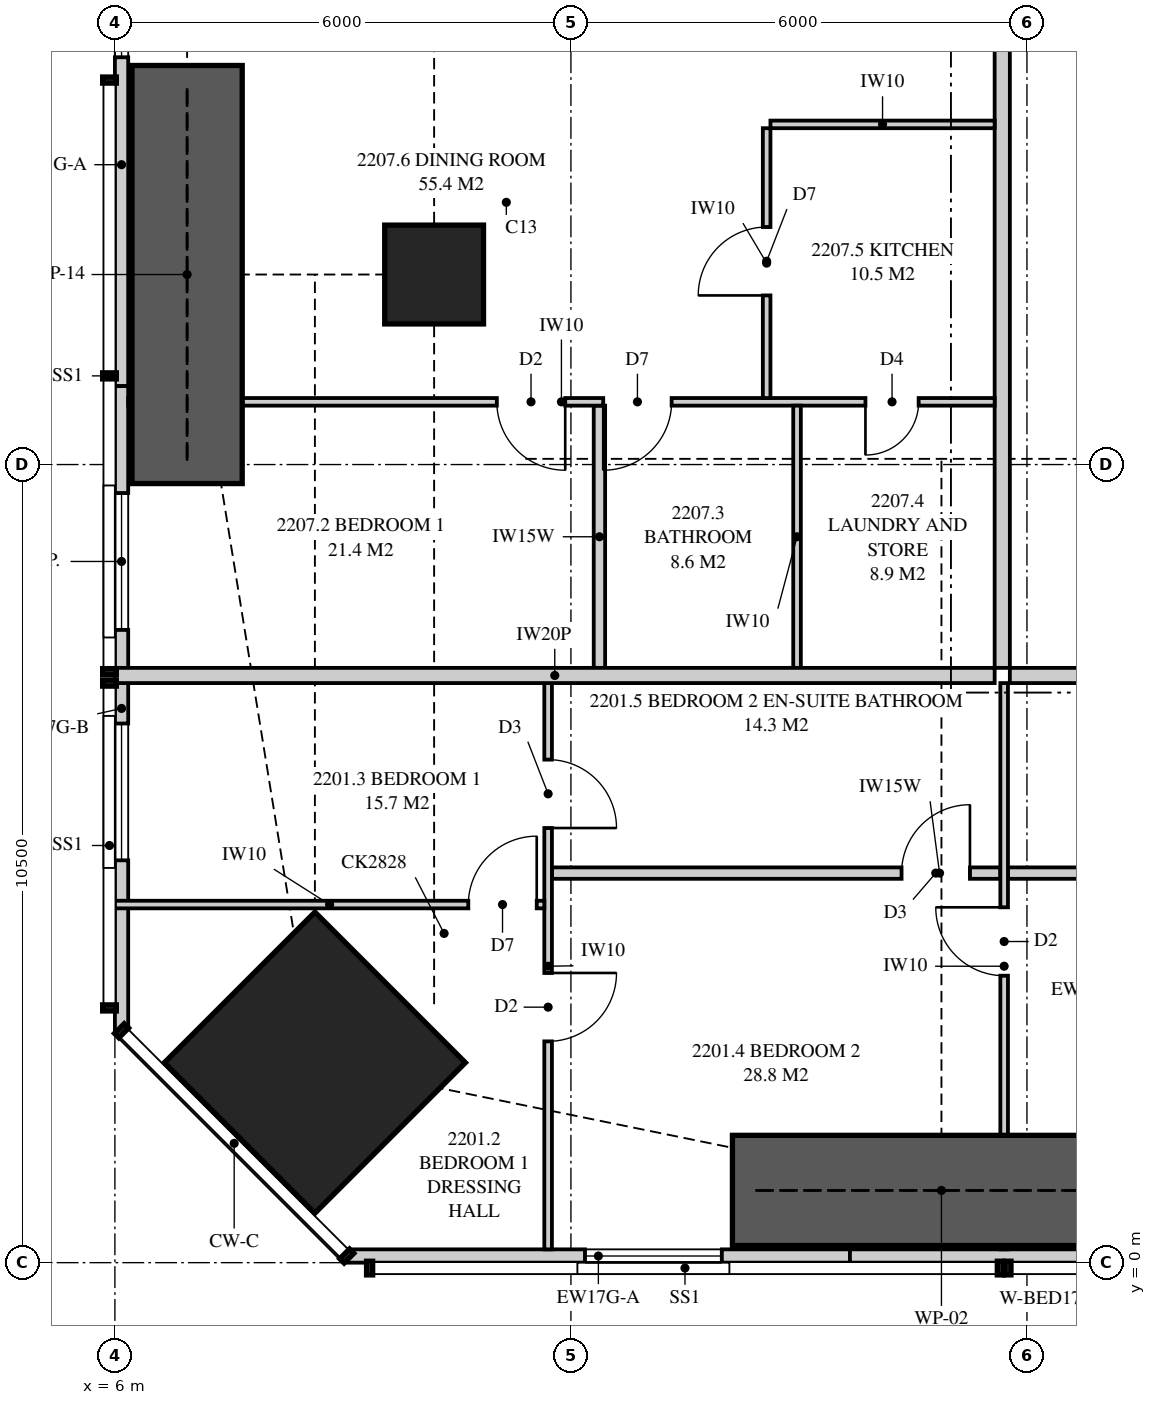
"""IFC4 building model, lengths in metres.
Left out: names, types, materials, properties, quantities, classifications, styles, units other than length and angle.
Written with IfcOpenShell. Run it as: python <this file> out.ifc"""

import sys

from ifc_helpers import new_model, si_unit, direction, frame, frame_2d, origin, origin_2d, place, context, subcontext, project, spatial, polyline, rectangle, hollow_rectangle, outline, extrude, element, fill, save


model = new_model("IFC4")
c1 = context("Model", 3, precision=1e-05, world=origin(), true_north=direction((0.0, 1.0)))
c2 = subcontext(c1, "Body", "Model", "MODEL_VIEW")
j1 = project(units=[si_unit("LENGTHUNIT", "METRE"), si_unit("PLANEANGLEUNIT", "RADIAN")], contexts=[c1])
p1 = place(None, origin())
s1 = spatial("IfcSite", under=j1, at=p1, CompositionType="ELEMENT")
p2 = place(p1, origin())
s2 = spatial("IfcBuilding", under=s1, at=p2, CompositionType="ELEMENT")
p3 = place(p2, frame((0.0, 0.0, 84.75)))
s3 = spatial("IfcBuildingStorey", under=s2, at=p3, CompositionType="ELEMENT", Elevation=84.75)
p4 = place(p3, frame((8.631, 2.631, 0.0), z_axis=(0.0, 0.0, 1.0), x_axis=(0.707106781187, 0.707106781187, 0.0)))
e1 = element("IfcColumn", 1, at=p4, inside=s3, PredefinedType="COLUMN", context=c2, shape_type="SweptSolid", body=[
    extrude(hollow_rectangle(XDim=2.8, YDim=2.8, WallThickness=0.175, at=origin_2d()), origin(), (0.0, 0.0, 1.0), 3.35),
])
p5 = place(p3, frame((10.2, 13.0, 0.0), z_axis=(0.0, 0.0, 1.0), x_axis=(1.0, 0.0, 0.0)))
e2 = element("IfcColumn", 2, at=p5, inside=s3, PredefinedType="COLUMN", context=c2, shape_type="SweptSolid", body=[
    extrude(rectangle(XDim=1.3, YDim=1.3, at=origin_2d()), origin(), (0.0, 0.0, 1.0), 3.35),
])
p6 = place(p3, frame((9.051, 0.087, 0.0), z_axis=(0.0, 0.0, 1.0), x_axis=(1.0, 0.0, 0.0)))
e3 = element("IfcWall", 3, at=p6, inside=s3, PredefinedType="SOLIDWALL", context=c2, shape_type="SweptSolid", body=[
    extrude(rectangle(XDim=6.62, YDim=0.175, at=frame_2d((3.31, 0.0))), origin(), (0.0, 0.0, 1.0), 3.11),
])
p7 = place(p6, frame((3.134, 0.0, 0.4)))
e4 = element("IfcOpeningElement", 4, at=p7, cuts=e3, PredefinedType="OPENING", context=c2, shape_type="SweptSolid", body=[
    extrude(rectangle(XDim=1.8, YDim=1.7, at=frame_2d((0.9, 0.85))), frame((0.0, 0.097, 0.0), z_axis=(0.0, -1.0, 0.0), x_axis=(1.0, 0.0, 0.0)), (0.0, 0.0, 1.0), 0.195),
])
p8 = place(p3, frame((15.671, 0.087, 0.0), z_axis=(0.0, 0.0, 1.0), x_axis=(1.0, 0.0, 0.0)))
e5 = element("IfcWall", 5, at=p8, inside=s3, PredefinedType="SOLIDWALL", context=c2, shape_type="SweptSolid", body=[
    extrude(rectangle(XDim=6.379, YDim=0.175, at=frame_2d((3.189, 0.0))), origin(), (0.0, 0.0, 1.0), 2.15),
])
p9 = place(p8, frame((4.087, 0.0, 0.4)))
e6 = element("IfcOpeningElement", 6, at=p9, cuts=e5, PredefinedType="OPENING", context=c2, shape_type="SweptSolid", body=[
    extrude(rectangle(XDim=1.8, YDim=1.7, at=frame_2d((0.9, 0.85))), frame((0.0, 0.097, 0.0), z_axis=(0.0, -1.0, 0.0), x_axis=(1.0, 0.0, 0.0)), (0.0, 0.0, 1.0), 0.195),
])
p10 = place(p3, frame((6.087, 17.358, 0.0), z_axis=(0.0, 0.0, 1.0), x_axis=(0.0, -1.0, 0.0)))
e7 = element("IfcWall", 7, at=p10, inside=s3, PredefinedType="SOLIDWALL", context=c2, shape_type="SweptSolid", body=[
    extrude(outline(polyline([(5.118, 0.092), (5.118, 0.0), (5.826, 0.0), (5.826, 2.15), (0.0, 2.15), (0.0, 0.0), (3.598, 0.0), (3.598, 0.092), (5.118, 0.092)])), frame((0.0, 0.087, 0.0), z_axis=(0.0, -1.0, 0.0), x_axis=(1.0, 0.0, 0.0)), (0.0, 0.0, 1.0), 0.175),
])
p11 = place(p10, frame((0.3, 0.0, 0.4)))
e8 = element("IfcOpeningElement", 8, at=p11, cuts=e7, PredefinedType="OPENING", context=c2, shape_type="SweptSolid", body=[
    extrude(rectangle(XDim=1.2, YDim=1.7, at=frame_2d((0.6, 0.85))), frame((0.0, 0.097, 0.0), z_axis=(0.0, -1.0, 0.0), x_axis=(1.0, 0.0, 0.0)), (0.0, 0.0, 1.0), 0.195),
])
p12 = place(p3, frame((6.087, 11.532, 0.0), z_axis=(0.0, 0.0, 1.0), x_axis=(0.0, -1.0, 0.0)))
e9 = element("IfcWall", 9, at=p12, inside=s3, PredefinedType="SOLIDWALL", context=c2, shape_type="SweptSolid", body=[
    extrude(rectangle(XDim=8.481, YDim=0.175, at=frame_2d((4.24, 0.0))), origin(), (0.0, 0.0, 1.0), 3.11),
])
p13 = place(p12, frame((1.407, 0.0, 0.4)))
e10 = element("IfcOpeningElement", 10, at=p13, cuts=e9, PredefinedType="OPENING", context=c2, shape_type="SweptSolid", body=[
    extrude(rectangle(XDim=1.8, YDim=1.7, at=frame_2d((0.9, 0.85))), frame((0.0, 0.097, 0.0), z_axis=(0.0, -1.0, 0.0), x_axis=(1.0, 0.0, 0.0)), (0.0, 0.0, 1.0), 0.195),
])
p14 = place(p12, frame((4.439, 0.0, 0.4)))
e11 = element("IfcOpeningElement", 11, at=p14, cuts=e9, PredefinedType="OPENING", context=c2, shape_type="SweptSolid", body=[
    extrude(rectangle(XDim=1.8, YDim=1.7, at=frame_2d((0.9, 0.85))), frame((0.0, 0.097, 0.0), z_axis=(0.0, -1.0, 0.0), x_axis=(1.0, 0.0, 0.0)), (0.0, 0.0, 1.0), 0.195),
])
p15 = place(p3, frame((17.775, 7.725, 0.0), z_axis=(0.0, 0.0, 1.0), x_axis=(1.0, 0.0, 0.0)))
e12 = element("IfcWall", 12, at=p15, inside=s3, PredefinedType="PARTITIONING", context=c2, shape_type="SweptSolid", body=[
    extrude(rectangle(XDim=4.325, YDim=0.2, at=frame_2d((2.163, 0.0))), origin(), (0.0, 0.0, 1.0), 3.11),
])
p16 = place(p3, frame((11.7, 0.175, 0.0), z_axis=(0.0, 0.0, 1.0), x_axis=(0.0, 1.0, 0.0)))
e13 = element("IfcWall", 13, at=p16, inside=s3, PredefinedType="PARTITIONING", context=c2, shape_type="SweptSolid", body=[
    extrude(outline(polyline([(0.0, 0.0), (7.45, 0.0), (7.45, 3.11), (2.912, 3.11), (2.912, 2.15), (0.749, 2.15), (0.749, 3.11), (0.0, 3.11), (0.0, 0.0)])), frame((0.0, 0.05, 0.0), z_axis=(0.0, -1.0, 0.0), x_axis=(1.0, 0.0, 0.0)), (0.0, 0.0, 1.0), 0.1),
])
p17 = place(p16, frame((2.736, 0.0, 0.0)))
e14 = element("IfcOpeningElement", 14, at=p17, cuts=e13, PredefinedType="OPENING", context=c2, shape_type="SweptSolid", body=[
    extrude(rectangle(XDim=0.9, YDim=2.1, at=frame_2d((0.45, 1.05))), frame((0.0, 0.06, 0.0), z_axis=(0.0, -1.0, 0.0), x_axis=(1.0, 0.0, 0.0)), (0.0, 0.0, 1.0), 0.12),
])
p18 = place(p16, frame((5.543, 0.0, 0.0)))
e15 = element("IfcOpeningElement", 15, at=p18, cuts=e13, PredefinedType="OPENING", context=c2, shape_type="SweptSolid", body=[
    extrude(rectangle(XDim=0.9, YDim=2.1, at=frame_2d((0.45, 1.05))), frame((0.0, 0.06, 0.0), z_axis=(0.0, -1.0, 0.0), x_axis=(1.0, 0.0, 0.0)), (0.0, 0.0, 1.0), 0.12),
])
p19 = place(p3, frame((17.7, 0.175, 0.0), z_axis=(0.0, 0.0, 1.0), x_axis=(0.0, 1.0, 0.0)))
e16 = element("IfcWall", 16, at=p19, inside=s3, PredefinedType="PARTITIONING", context=c2, shape_type="SweptSolid", body=[
    extrude(outline(polyline([(1.835, 2.15), (0.0, 2.15), (0.0, 0.0), (0.529, 0.0), (0.529, 0.625), (1.021, 0.625), (1.021, 0.0), (7.45, 0.0), (7.45, 3.11), (1.835, 3.11), (1.835, 2.15)]), holes=[polyline([(1.021, 1.075), (0.529, 1.075), (0.529, 1.905), (1.021, 1.905), (1.021, 1.075)])]), frame((0.0, 0.05, 0.0), z_axis=(0.0, -1.0, 0.0), x_axis=(1.0, 0.0, 0.0)), (0.0, 0.0, 1.0), 0.1),
])
p20 = place(p19, frame((3.6, 0.0, 0.0)))
e17 = element("IfcOpeningElement", 17, at=p20, cuts=e16, PredefinedType="OPENING", context=c2, shape_type="SweptSolid", body=[
    extrude(rectangle(XDim=0.9, YDim=2.1, at=frame_2d((0.45, 1.05))), frame((0.0, 0.06, 0.0), z_axis=(0.0, -1.0, 0.0), x_axis=(1.0, 0.0, 0.0)), (0.0, 0.0, 1.0), 0.12),
])
p21 = place(p3, frame((6.0, 4.711, 0.0), z_axis=(0.0, 0.0, 1.0), x_axis=(1.0, 0.0, 0.0)))
e18 = element("IfcWall", 18, at=p21, inside=s3, PredefinedType="PARTITIONING", context=c2, shape_type="SweptSolid", body=[
    extrude(outline(polyline([(0.0, 0.0), (5.65, 0.0), (5.65, 3.11), (5.46, 3.11), (5.46, 2.51), (3.368, 2.51), (3.368, 2.15), (1.22, 2.15), (1.22, 3.11), (0.0, 3.11), (0.0, 0.0)])), frame((0.0, 0.05, 0.0), z_axis=(0.0, -1.0, 0.0), x_axis=(1.0, 0.0, 0.0)), (0.0, 0.0, 1.0), 0.1),
])
p22 = place(p21, frame((4.65, 0.0, 0.0)))
e19 = element("IfcOpeningElement", 19, at=p22, cuts=e18, PredefinedType="OPENING", context=c2, shape_type="SweptSolid", body=[
    extrude(rectangle(XDim=0.9, YDim=2.1, at=frame_2d((0.45, 1.05))), frame((0.0, 0.06, 0.0), z_axis=(0.0, -1.0, 0.0), x_axis=(1.0, 0.0, 0.0)), (0.0, 0.0, 1.0), 0.12),
])
p23 = place(p3, frame((11.75, 5.125, 0.0), z_axis=(0.0, 0.0, 1.0), x_axis=(1.0, 0.0, 0.0)))
e20 = element("IfcWall", 20, at=p23, inside=s3, PredefinedType="PLUMBINGWALL", context=c2, shape_type="SweptSolid", body=[
    extrude(outline(polyline([(0.0, 0.0), (5.9, 0.0), (5.9, 3.11), (5.446, 3.11), (5.446, 2.531), (4.804, 2.531), (4.804, 3.11), (0.0, 3.11), (0.0, 0.0)])), frame((0.0, 0.075, 0.0), z_axis=(0.0, -1.0, 0.0), x_axis=(1.0, 0.0, 0.0)), (0.0, 0.0, 1.0), 0.15),
])
p24 = place(p23, frame((4.6, 0.0, 0.0)))
e21 = element("IfcOpeningElement", 21, at=p24, cuts=e20, PredefinedType="OPENING", context=c2, shape_type="SweptSolid", body=[
    extrude(rectangle(XDim=0.9, YDim=2.1, at=frame_2d((0.45, 1.05))), frame((0.0, 0.085, 0.0), z_axis=(0.0, -1.0, 0.0), x_axis=(1.0, 0.0, 0.0)), (0.0, 0.0, 1.0), 0.17),
])
p25 = place(p3, frame((17.75, 5.125, 0.0), z_axis=(0.0, 0.0, 1.0), x_axis=(1.0, 0.0, 0.0)))
e22 = element("IfcWall", 22, at=p25, inside=s3, PredefinedType="PLUMBINGWALL", context=c2, shape_type="SweptSolid", body=[
    extrude(rectangle(XDim=4.2, YDim=0.15, at=frame_2d((2.1, 0.0))), origin(), (0.0, 0.0, 1.0), 3.11),
])
p26 = place(p3, frame((6.0, 7.725, 0.0), z_axis=(0.0, 0.0, 1.0), x_axis=(1.0, 0.0, 0.0)))
e23 = element("IfcWall", 23, at=p26, inside=s3, PredefinedType="PARTITIONING", context=c2, shape_type="SweptSolid", body=[
    extrude(outline(polyline([(0.0, 0.0), (11.575, 0.0), (11.575, 3.11), (11.221, 3.11), (11.221, 2.531), (10.529, 2.531), (10.529, 3.11), (5.51, 3.11), (5.51, 2.51), (2.978, 2.51), (2.978, 2.531), (2.93, 2.531), (2.93, 2.15), (0.681, 2.15), (0.681, 3.11), (0.0, 3.11), (0.0, 0.0)])), frame((0.0, 0.1, 0.0), z_axis=(0.0, -1.0, 0.0), x_axis=(1.0, 0.0, 0.0)), (0.0, 0.0, 1.0), 0.2),
])
p27 = place(p3, frame((17.675, 7.825, 0.0), z_axis=(0.0, 0.0, 1.0), x_axis=(0.0, 1.0, 0.0)))
e24 = element("IfcWall", 24, at=p27, inside=s3, PredefinedType="PARTITIONING", context=c2, shape_type="SweptSolid", body=[
    extrude(outline(polyline([(0.0, 0.0), (9.075, 0.0), (9.075, 3.11), (3.096, 3.11), (3.096, 2.531), (2.404, 2.531), (2.404, 3.11), (0.0, 3.11), (0.0, 0.0)])), frame((0.0, 0.1, 0.0), z_axis=(0.0, -1.0, 0.0), x_axis=(1.0, 0.0, 0.0)), (0.0, 0.0, 1.0), 0.2),
])
p28 = place(p3, frame((6.175, 11.325, 0.0), z_axis=(0.0, 0.0, 1.0), x_axis=(1.0, 0.0, 0.0)))
e25 = element("IfcWall", 25, at=p28, inside=s3, PredefinedType="PARTITIONING", context=c2, shape_type="SweptSolid", body=[
    extrude(outline(polyline([(0.0, 0.0), (11.4, 0.0), (11.4, 3.11), (5.285, 3.11), (5.285, 2.51), (2.765, 2.51), (2.765, 3.11), (2.753, 3.11), (2.753, 2.531), (2.16, 2.531), (2.16, 3.11), (2.121, 3.11), (2.121, 2.15), (1.021, 2.15), (1.021, 1.734), (0.529, 1.734), (0.529, 2.15), (0.0, 2.15), (0.0, 0.0)])), frame((0.0, 0.05, 0.0), z_axis=(0.0, -1.0, 0.0), x_axis=(1.0, 0.0, 0.0)), (0.0, 0.0, 1.0), 0.1),
])
p29 = place(p28, frame((4.85, 0.0, 0.0)))
e26 = element("IfcOpeningElement", 26, at=p29, cuts=e25, PredefinedType="OPENING", context=c2, shape_type="SweptSolid", body=[
    extrude(rectangle(XDim=0.9, YDim=2.1, at=frame_2d((0.45, 1.05))), frame((0.0, 0.06, 0.0), z_axis=(0.0, -1.0, 0.0), x_axis=(1.0, 0.0, 0.0)), (0.0, 0.0, 1.0), 0.12),
])
p30 = place(p28, frame((6.25, 0.0, 0.0)))
e27 = element("IfcOpeningElement", 27, at=p30, cuts=e25, PredefinedType="OPENING", context=c2, shape_type="SweptSolid", body=[
    extrude(rectangle(XDim=0.9, YDim=2.1, at=frame_2d((0.45, 1.05))), frame((0.0, 0.06, 0.0), z_axis=(0.0, -1.0, 0.0), x_axis=(1.0, 0.0, 0.0)), (0.0, 0.0, 1.0), 0.12),
])
p31 = place(p28, frame((9.7, 0.0, 0.0)))
e28 = element("IfcOpeningElement", 28, at=p31, cuts=e25, PredefinedType="OPENING", context=c2, shape_type="SweptSolid", body=[
    extrude(rectangle(XDim=0.7, YDim=2.1, at=frame_2d((0.35, 1.05))), frame((0.0, 0.06, 0.0), z_axis=(0.0, -1.0, 0.0), x_axis=(1.0, 0.0, 0.0)), (0.0, 0.0, 1.0), 0.12),
])
p32 = place(p3, frame((12.375, 7.825, 0.0), z_axis=(0.0, 0.0, 1.0), x_axis=(0.0, 1.0, 0.0)))
e29 = element("IfcWall", 29, at=p32, inside=s3, PredefinedType="PLUMBINGWALL", context=c2, shape_type="SweptSolid", body=[
    extrude(outline(polyline([(0.0, 0.0), (3.45, 0.0), (3.45, 3.11), (3.071, 3.11), (3.071, 2.531), (2.429, 2.531), (2.429, 3.11), (0.0, 3.11), (0.0, 0.0)])), frame((0.0, 0.075, 0.0), z_axis=(0.0, -1.0, 0.0), x_axis=(1.0, 0.0, 0.0)), (0.0, 0.0, 1.0), 0.15),
])
p33 = place(p3, frame((14.975, 7.825, 0.0), z_axis=(0.0, 0.0, 1.0), x_axis=(0.0, 1.0, 0.0)))
e30 = element("IfcWall", 30, at=p33, inside=s3, PredefinedType="PARTITIONING", context=c2, shape_type="SweptSolid", body=[
    extrude(outline(polyline([(0.0, 0.0), (3.45, 0.0), (3.45, 3.11), (3.046, 3.11), (3.046, 2.531), (2.454, 2.531), (2.454, 3.11), (0.0, 3.11), (0.0, 0.0)])), frame((0.0, 0.05, 0.0), z_axis=(0.0, -1.0, 0.0), x_axis=(1.0, 0.0, 0.0)), (0.0, 0.0, 1.0), 0.1),
])
p34 = place(p3, frame((14.575, 11.375, 0.0), z_axis=(0.0, 0.0, 1.0), x_axis=(0.0, 1.0, 0.0)))
e31 = element("IfcWall", 31, at=p34, inside=s3, PredefinedType="PARTITIONING", context=c2, shape_type="SweptSolid", body=[
    extrude(rectangle(XDim=3.55, YDim=0.1, at=frame_2d((1.775, 0.0))), origin(), (0.0, 0.0, 1.0), 3.11),
])
p35 = place(p34, frame((1.35, 0.0, 0.0)))
e32 = element("IfcOpeningElement", 32, at=p35, cuts=e31, PredefinedType="OPENING", context=c2, shape_type="SweptSolid", body=[
    extrude(rectangle(XDim=0.9, YDim=2.1, at=frame_2d((0.45, 1.05))), frame((0.0, 0.06, 0.0), z_axis=(0.0, -1.0, 0.0), x_axis=(1.0, 0.0, 0.0)), (0.0, 0.0, 1.0), 0.12),
])
p36 = place(p3, frame((14.625, 14.975, 0.0), z_axis=(0.0, 0.0, 1.0), x_axis=(1.0, 0.0, 0.0)))
e33 = element("IfcWall", 33, at=p36, inside=s3, PredefinedType="PARTITIONING", context=c2, shape_type="SweptSolid", body=[
    extrude(rectangle(XDim=2.95, YDim=0.1, at=frame_2d((1.475, 0.0))), origin(), (0.0, 0.0, 1.0), 3.11),
])
for number, where, z_axis, x_axis in (
    (34, (14.125, 0.95, 0.0), (0.0, 0.0, 1.0), (1.0, 0.0, 0.0)),
    (35, (6.95, 10.25, 0.0), (0.0, 0.0, 1.0), (0.0, 1.0, 0.0)),
):
    element("IfcWall", number, at=place(p3, frame(where, z_axis=z_axis, x_axis=x_axis)), inside=s3, PredefinedType="SHEAR", context=c2, shape_type="SweptSolid", body=[
        extrude(rectangle(XDim=5.5, YDim=1.45, at=frame_2d((2.75, 0.0))), origin(), (0.0, 0.0, 1.0), 3.35),
    ])
p37 = place(p7, origin())
e36 = element("IfcWindow", 36, at=p37, inside=s3, PartitioningType="SINGLE_PANEL", PredefinedType="WINDOW", context=c2, shape_type="SweptSolid", body=[
    extrude(rectangle(XDim=1.8, YDim=1.7, at=frame_2d((0.9, 0.85))), frame((0.0, 0.03, 0.0), z_axis=(0.0, -1.0, 0.0), x_axis=(1.0, 0.0, 0.0)), (0.0, 0.0, 1.0), 0.06),
])
fill(e4, e36)
p38 = place(p11, origin())
e37 = element("IfcWindow", 37, at=p38, inside=s3, PartitioningType="SINGLE_PANEL", PredefinedType="WINDOW", context=c2, shape_type="SweptSolid", body=[
    extrude(rectangle(XDim=1.2, YDim=1.7, at=frame_2d((0.6, 0.85))), frame((0.0, 0.03, 0.0), z_axis=(0.0, -1.0, 0.0), x_axis=(1.0, 0.0, 0.0)), (0.0, 0.0, 1.0), 0.06),
])
fill(e8, e37)
p39 = place(p13, origin())
e38 = element("IfcWindow", 38, at=p39, inside=s3, PartitioningType="SINGLE_PANEL", PredefinedType="WINDOW", context=c2, shape_type="SweptSolid", body=[
    extrude(rectangle(XDim=1.8, YDim=1.7, at=frame_2d((0.9, 0.85))), frame((0.0, 0.03, 0.0), z_axis=(0.0, -1.0, 0.0), x_axis=(1.0, 0.0, 0.0)), (0.0, 0.0, 1.0), 0.06),
])
fill(e10, e38)
p40 = place(p14, origin())
e39 = element("IfcWindow", 39, at=p40, inside=s3, PartitioningType="SINGLE_PANEL", PredefinedType="WINDOW", context=c2, shape_type="SweptSolid", body=[
    extrude(rectangle(XDim=1.8, YDim=1.7, at=frame_2d((0.9, 0.85))), frame((0.0, 0.03, 0.0), z_axis=(0.0, -1.0, 0.0), x_axis=(1.0, 0.0, 0.0)), (0.0, 0.0, 1.0), 0.06),
])
fill(e11, e39)
p41 = place(p22, origin())
e40 = element("IfcDoor", 40, at=p41, inside=s3, OperationType="SINGLE_SWING_RIGHT", PredefinedType="DOOR", context=c2, shape_type="SweptSolid", body=[
    extrude(rectangle(XDim=0.9, YDim=2.1, at=frame_2d((0.45, 1.05))), frame((0.0, 0.025, 0.0), z_axis=(0.0, -1.0, 0.0), x_axis=(1.0, 0.0, 0.0)), (0.0, 0.0, 1.0), 0.05),
])
fill(e19, e40)
p42 = place(p17, frame((0.9, 0.0, 0.0), z_axis=(0.0, 0.0, 1.0), x_axis=(-1.0, 0.0, 0.0)))
e41 = element("IfcDoor", 41, at=p42, inside=s3, OperationType="SINGLE_SWING_LEFT", PredefinedType="DOOR", context=c2, shape_type="SweptSolid", body=[
    extrude(rectangle(XDim=0.9, YDim=2.1, at=frame_2d((0.45, 1.05))), frame((0.0, 0.025, 0.0), z_axis=(0.0, -1.0, 0.0), x_axis=(1.0, 0.0, 0.0)), (0.0, 0.0, 1.0), 0.05),
])
fill(e14, e41)
p43 = place(p20, origin())
e42 = element("IfcDoor", 42, at=p43, inside=s3, OperationType="SINGLE_SWING_RIGHT", PredefinedType="DOOR", context=c2, shape_type="SweptSolid", body=[
    extrude(rectangle(XDim=0.9, YDim=2.1, at=frame_2d((0.45, 1.05))), frame((0.0, 0.025, 0.0), z_axis=(0.0, -1.0, 0.0), x_axis=(1.0, 0.0, 0.0)), (0.0, 0.0, 1.0), 0.05),
])
fill(e17, e42)
p44 = place(p24, origin())
e43 = element("IfcDoor", 43, at=p44, inside=s3, OperationType="SINGLE_SWING_RIGHT", PredefinedType="DOOR", context=c2, shape_type="SweptSolid", body=[
    extrude(rectangle(XDim=0.9, YDim=2.1, at=frame_2d((0.45, 1.05))), frame((0.0, 0.025, 0.0), z_axis=(0.0, -1.0, 0.0), x_axis=(1.0, 0.0, 0.0)), (0.0, 0.0, 1.0), 0.05),
])
fill(e21, e43)
p45 = place(p18, frame((0.9, 0.0, 0.0), z_axis=(0.0, 0.0, 1.0), x_axis=(-1.0, 0.0, 0.0)))
e44 = element("IfcDoor", 44, at=p45, inside=s3, OperationType="SINGLE_SWING_RIGHT", PredefinedType="DOOR", context=c2, shape_type="SweptSolid", body=[
    extrude(rectangle(XDim=0.9, YDim=2.1, at=frame_2d((0.45, 1.05))), frame((0.0, 0.025, 0.0), z_axis=(0.0, -1.0, 0.0), x_axis=(1.0, 0.0, 0.0)), (0.0, 0.0, 1.0), 0.05),
])
fill(e15, e44)
p46 = place(p29, frame((0.9, 0.0, 0.0), z_axis=(0.0, 0.0, 1.0), x_axis=(-1.0, 0.0, 0.0)))
e45 = element("IfcDoor", 45, at=p46, inside=s3, OperationType="SINGLE_SWING_LEFT", PredefinedType="DOOR", context=c2, shape_type="SweptSolid", body=[
    extrude(rectangle(XDim=0.9, YDim=2.1, at=frame_2d((0.45, 1.05))), frame((0.0, 0.025, 0.0), z_axis=(0.0, -1.0, 0.0), x_axis=(1.0, 0.0, 0.0)), (0.0, 0.0, 1.0), 0.05),
])
fill(e26, e45)
p47 = place(p30, frame((0.9, 0.0, 0.0), z_axis=(0.0, 0.0, 1.0), x_axis=(-1.0, 0.0, 0.0)))
e46 = element("IfcDoor", 46, at=p47, inside=s3, OperationType="SINGLE_SWING_RIGHT", PredefinedType="DOOR", context=c2, shape_type="SweptSolid", body=[
    extrude(rectangle(XDim=0.9, YDim=2.1, at=frame_2d((0.45, 1.05))), frame((0.0, 0.025, 0.0), z_axis=(0.0, -1.0, 0.0), x_axis=(1.0, 0.0, 0.0)), (0.0, 0.0, 1.0), 0.05),
])
fill(e27, e46)
p48 = place(p31, frame((0.7, 0.0, 0.0), z_axis=(0.0, 0.0, 1.0), x_axis=(-1.0, 0.0, 0.0)))
e47 = element("IfcDoor", 47, at=p48, inside=s3, OperationType="SINGLE_SWING_RIGHT", PredefinedType="DOOR", context=c2, shape_type="SweptSolid", body=[
    extrude(rectangle(XDim=0.7, YDim=2.1, at=frame_2d((0.35, 1.05))), frame((0.0, 0.025, 0.0), z_axis=(0.0, -1.0, 0.0), x_axis=(1.0, 0.0, 0.0)), (0.0, 0.0, 1.0), 0.05),
])
fill(e28, e47)
p49 = place(p35, origin())
e48 = element("IfcDoor", 48, at=p49, inside=s3, OperationType="SINGLE_SWING_LEFT", PredefinedType="DOOR", context=c2, shape_type="SweptSolid", body=[
    extrude(rectangle(XDim=0.9, YDim=2.1, at=frame_2d((0.45, 1.05))), frame((0.0, 0.025, 0.0), z_axis=(0.0, -1.0, 0.0), x_axis=(1.0, 0.0, 0.0)), (0.0, 0.0, 1.0), 0.05),
])
fill(e32, e48)
save(model, sys.argv[1])
